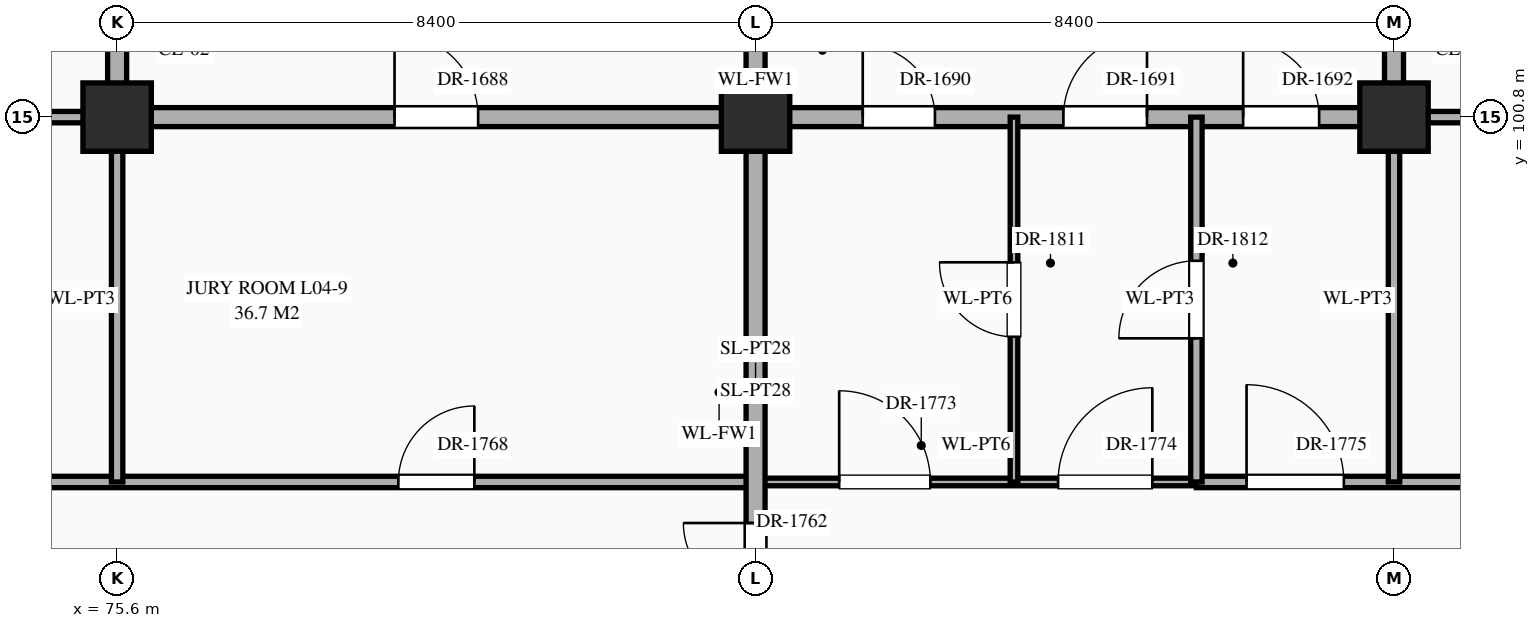
"""IFC4 building model, lengths in metres.
Left out: names, types, materials, properties, quantities, classifications, styles, units other than length and angle.
Written with IfcOpenShell. Run it as: python <this file> out.ifc"""

import sys

from ifc_helpers import new_model, si_unit, direction, frame, frame_2d, origin, origin_2d, place, context, subcontext, project, spatial, rectangle, extrude, element, fill, save


model = new_model("IFC4")
c1 = context("Model", 3, precision=1e-05, world=origin(), true_north=direction((0.0, 1.0)))
c2 = subcontext(c1, "Body", "Model", "MODEL_VIEW")
j1 = project(units=[si_unit("LENGTHUNIT", "METRE"), si_unit("PLANEANGLEUNIT", "RADIAN")], contexts=[c1])
p1 = place(None, origin())
s1 = spatial("IfcSite", under=j1, at=p1, CompositionType="ELEMENT")
p2 = place(p1, origin())
s2 = spatial("IfcBuilding", under=s1, at=p2, CompositionType="ELEMENT")
p3 = place(p2, frame((0.0, 0.0, 16.2)))
s3 = spatial("IfcBuildingStorey", under=s2, at=p3, CompositionType="ELEMENT", Elevation=16.2)
for number, where, z_axis, x_axis in (
    (1, (75.6, 100.8, 0.0), (0.0, 0.0, 1.0), (1.0, 0.0, 0.0)),
    (2, (84.0, 100.8, 0.0), (0.0, 0.0, 1.0), (1.0, 0.0, 0.0)),
    (3, (92.4, 100.8, 0.0), (0.0, 0.0, 1.0), (1.0, 0.0, 0.0)),
):
    element("IfcColumn", number, at=place(p3, frame(where, z_axis=z_axis, x_axis=x_axis)), inside=s3, PredefinedType="COLUMN", context=c2, shape_type="SweptSolid", body=[
        extrude(rectangle(XDim=0.9, YDim=0.9, at=origin_2d()), origin(), (0.0, 0.0, 1.0), 5.4),
    ])
p4 = place(p3, frame((56.2, 96.0, 0.0), z_axis=(0.0, 0.0, 1.0), x_axis=(1.0, 0.0, 0.0)))
e4 = element("IfcWall", 4, at=p4, inside=s3, PredefinedType="STANDARD", context=c2, shape_type="SweptSolid", body=[
    extrude(rectangle(XDim=27.8, YDim=0.15, at=frame_2d((13.9, 0.0))), origin(), (0.0, 0.0, 1.0), 5.12),
])
p5 = place(p4, frame((0.87, 0.0, 0.0)))
e5 = element("IfcOpeningElement", 5, at=p5, cuts=e4, PredefinedType="OPENING", context=c2, shape_type="SweptSolid", body=[
    extrude(rectangle(XDim=0.86, YDim=2.1, at=frame_2d((0.43, 1.05))), frame((0.0, 0.087, 0.0), z_axis=(0.0, -1.0, 0.0), x_axis=(1.0, 0.0, 0.0)), (0.0, 0.0, 1.0), 0.174),
])
p6 = place(p4, frame((6.34, 0.0, 0.0)))
e6 = element("IfcOpeningElement", 6, at=p6, cuts=e4, PredefinedType="OPENING", context=c2, shape_type="SweptSolid", body=[
    extrude(rectangle(XDim=0.92, YDim=2.15, at=frame_2d((0.46, 1.075))), frame((0.0, 0.087, 0.0), z_axis=(0.0, -1.0, 0.0), x_axis=(1.0, 0.0, 0.0)), (0.0, 0.0, 1.0), 0.174),
])
p7 = place(p4, frame((14.72, 0.0, 0.0)))
e7 = element("IfcOpeningElement", 7, at=p7, cuts=e4, PredefinedType="OPENING", context=c2, shape_type="SweptSolid", body=[
    extrude(rectangle(XDim=0.96, YDim=2.2, at=frame_2d((0.48, 1.1))), frame((0.0, 0.087, 0.0), z_axis=(0.0, -1.0, 0.0), x_axis=(1.0, 0.0, 0.0)), (0.0, 0.0, 1.0), 0.174),
])
p8 = place(p4, frame((23.1, 0.0, 0.0)))
e8 = element("IfcOpeningElement", 8, at=p8, cuts=e4, PredefinedType="OPENING", context=c2, shape_type="SweptSolid", body=[
    extrude(rectangle(XDim=1.0, YDim=2.25, at=frame_2d((0.5, 1.125))), frame((0.0, 0.087, 0.0), z_axis=(0.0, -1.0, 0.0), x_axis=(1.0, 0.0, 0.0)), (0.0, 0.0, 1.0), 0.174),
])
p9 = place(p3, frame((84.0, 96.0, 0.0), z_axis=(0.0, 0.0, 1.0), x_axis=(1.0, 0.0, 0.0)))
e9 = element("IfcWall", 9, at=p9, inside=s3, PredefinedType="STANDARD", context=c2, shape_type="SweptSolid", body=[
    extrude(rectangle(XDim=5.8, YDim=0.1, at=frame_2d((2.9, 0.0))), origin(), (0.0, 0.0, 1.0), 5.12),
])
p10 = place(p9, frame((1.1, 0.0, 0.0)))
e10 = element("IfcOpeningElement", 10, at=p10, cuts=e9, PredefinedType="OPENING", context=c2, shape_type="SweptSolid", body=[
    extrude(rectangle(XDim=1.2, YDim=2.35, at=frame_2d((0.6, 1.175))), frame((0.0, 0.062, 0.0), z_axis=(0.0, -1.0, 0.0), x_axis=(1.0, 0.0, 0.0)), (0.0, 0.0, 1.0), 0.124),
])
p11 = place(p9, frame((3.98, 0.0, 0.0)))
e11 = element("IfcOpeningElement", 11, at=p11, cuts=e9, PredefinedType="OPENING", context=c2, shape_type="SweptSolid", body=[
    extrude(rectangle(XDim=1.24, YDim=2.3, at=frame_2d((0.62, 1.15))), frame((0.0, 0.062, 0.0), z_axis=(0.0, -1.0, 0.0), x_axis=(1.0, 0.0, 0.0)), (0.0, 0.0, 1.0), 0.124),
])
p12 = place(p3, frame((89.8, 96.0, 0.0), z_axis=(0.0, 0.0, 1.0), x_axis=(1.0, 0.0, 0.0)))
e12 = element("IfcWall", 12, at=p12, inside=s3, PredefinedType="STANDARD", context=c2, shape_type="SweptSolid", body=[
    extrude(rectangle(XDim=19.4, YDim=0.15, at=frame_2d((9.7, 0.0))), origin(), (0.0, 0.0, 1.0), 5.12),
])
p13 = place(p12, frame((0.66, 0.0, 0.0)))
e13 = element("IfcOpeningElement", 13, at=p13, cuts=e12, PredefinedType="OPENING", context=c2, shape_type="SweptSolid", body=[
    extrude(rectangle(XDim=1.28, YDim=2.35, at=frame_2d((0.64, 1.175))), frame((0.0, 0.087, 0.0), z_axis=(0.0, -1.0, 0.0), x_axis=(1.0, 0.0, 0.0)), (0.0, 0.0, 1.0), 0.174),
])
p14 = place(p12, frame((6.33, 0.0, 0.0)))
e14 = element("IfcOpeningElement", 14, at=p14, cuts=e12, PredefinedType="OPENING", context=c2, shape_type="SweptSolid", body=[
    extrude(rectangle(XDim=0.94, YDim=2.3, at=frame_2d((0.47, 1.15))), frame((0.0, 0.087, 0.0), z_axis=(0.0, -1.0, 0.0), x_axis=(1.0, 0.0, 0.0)), (0.0, 0.0, 1.0), 0.174),
])
p15 = place(p12, frame((14.71, 0.0, 0.0)))
e15 = element("IfcOpeningElement", 15, at=p15, cuts=e12, PredefinedType="OPENING", context=c2, shape_type="SweptSolid", body=[
    extrude(rectangle(XDim=0.98, YDim=2.35, at=frame_2d((0.49, 1.175))), frame((0.0, 0.087, 0.0), z_axis=(0.0, -1.0, 0.0), x_axis=(1.0, 0.0, 0.0)), (0.0, 0.0, 1.0), 0.174),
])
p16 = place(p3, frame((71.4, 100.8, 0.0), z_axis=(0.0, 0.0, 1.0), x_axis=(1.0, 0.0, 0.0)))
e16 = element("IfcWall", 16, at=p16, inside=s3, PredefinedType="STANDARD", context=c2, shape_type="SweptSolid", body=[
    extrude(rectangle(XDim=4.2, YDim=0.15, at=frame_2d((2.1, 0.0))), origin(), (0.0, 0.0, 1.0), 4.27),
])
p17 = place(p16, frame((1.335, 0.0, 0.0)))
e17 = element("IfcOpeningElement", 17, at=p17, cuts=e16, PredefinedType="OPENING", context=c2, shape_type="SweptSolid", body=[
    extrude(rectangle(XDim=1.16, YDim=2.3, at=frame_2d((0.58, 1.15))), frame((0.0, 0.087, 0.0), z_axis=(0.0, -1.0, 0.0), x_axis=(1.0, 0.0, 0.0)), (0.0, 0.0, 1.0), 0.174),
])
p18 = place(p3, frame((75.6, 100.8, 0.0), z_axis=(0.0, 0.0, 1.0), x_axis=(1.0, 0.0, 0.0)))
e18 = element("IfcWall", 18, at=p18, inside=s3, PredefinedType="STANDARD", context=c2, shape_type="SweptSolid", body=[
    extrude(rectangle(XDim=16.8, YDim=0.25, at=frame_2d((8.4, 0.0))), origin(), (0.0, 0.0, 1.0), 4.27),
])
p19 = place(p18, frame((3.65, 0.0, 0.0)))
e19 = element("IfcOpeningElement", 19, at=p19, cuts=e18, PredefinedType="OPENING", context=c2, shape_type="SweptSolid", body=[
    extrude(rectangle(XDim=1.1, YDim=2.2, at=frame_2d((0.55, 1.1))), frame((0.0, 0.137, 0.0), z_axis=(0.0, -1.0, 0.0), x_axis=(1.0, 0.0, 0.0)), (0.0, 0.0, 1.0), 0.274),
])
p20 = place(p18, frame((9.81, 0.0, 0.0)))
e20 = element("IfcOpeningElement", 20, at=p20, cuts=e18, PredefinedType="OPENING", context=c2, shape_type="SweptSolid", body=[
    extrude(rectangle(XDim=0.95, YDim=2.15, at=frame_2d((0.475, 1.075))), frame((0.0, 0.137, 0.0), z_axis=(0.0, -1.0, 0.0), x_axis=(1.0, 0.0, 0.0)), (0.0, 0.0, 1.0), 0.274),
])
p21 = place(p18, frame((12.45, 0.0, 0.0)))
e21 = element("IfcOpeningElement", 21, at=p21, cuts=e18, PredefinedType="OPENING", context=c2, shape_type="SweptSolid", body=[
    extrude(rectangle(XDim=1.1, YDim=2.2, at=frame_2d((0.55, 1.1))), frame((0.0, 0.137, 0.0), z_axis=(0.0, -1.0, 0.0), x_axis=(1.0, 0.0, 0.0)), (0.0, 0.0, 1.0), 0.274),
])
p22 = place(p18, frame((14.815, 0.0, 0.0)))
e22 = element("IfcOpeningElement", 22, at=p22, cuts=e18, PredefinedType="OPENING", context=c2, shape_type="SweptSolid", body=[
    extrude(rectangle(XDim=1.0, YDim=2.2, at=frame_2d((0.5, 1.1))), frame((0.0, 0.137, 0.0), z_axis=(0.0, -1.0, 0.0), x_axis=(1.0, 0.0, 0.0)), (0.0, 0.0, 1.0), 0.274),
])
p23 = place(p3, frame((92.4, 100.8, 0.0), z_axis=(0.0, 0.0, 1.0), x_axis=(1.0, 0.0, 0.0)))
e23 = element("IfcWall", 23, at=p23, inside=s3, PredefinedType="STANDARD", context=c2, shape_type="SweptSolid", body=[
    extrude(rectangle(XDim=4.2, YDim=0.15, at=frame_2d((2.1, 0.0))), origin(), (0.0, 0.0, 1.0), 4.27),
])
p24 = place(p23, frame((1.795, 0.0, 0.0)))
e24 = element("IfcOpeningElement", 24, at=p24, cuts=e23, PredefinedType="OPENING", context=c2, shape_type="SweptSolid", body=[
    extrude(rectangle(XDim=0.98, YDim=2.35, at=frame_2d((0.49, 1.175))), frame((0.0, 0.087, 0.0), z_axis=(0.0, -1.0, 0.0), x_axis=(1.0, 0.0, 0.0)), (0.0, 0.0, 1.0), 0.174),
])
p25 = place(p3, frame((75.6, 96.0, 0.0), z_axis=(0.0, 0.0, 1.0), x_axis=(0.0, 1.0, 0.0)))
e25 = element("IfcWall", 25, at=p25, inside=s3, PredefinedType="STANDARD", context=c2, shape_type="SweptSolid", body=[
    extrude(rectangle(XDim=4.8, YDim=0.15, at=frame_2d((2.4, 0.0))), origin(), (0.0, 0.0, 1.0), 4.37),
])
p26 = place(p3, frame((75.6, 100.8, 0.0), z_axis=(0.0, 0.0, 1.0), x_axis=(0.0, 1.0, 0.0)))
e26 = element("IfcWall", 26, at=p26, inside=s3, PredefinedType="STANDARD", context=c2, shape_type="SweptSolid", body=[
    extrude(rectangle(XDim=3.6, YDim=0.25, at=frame_2d((1.8, 0.0))), origin(), (0.0, 0.0, 1.0), 4.37),
])
p27 = place(p26, frame((0.91, 0.0, 0.0)))
e27 = element("IfcOpeningElement", 27, at=p27, cuts=e26, PredefinedType="OPENING", context=c2, shape_type="SweptSolid", body=[
    extrude(rectangle(XDim=0.95, YDim=2.15, at=frame_2d((0.475, 1.075))), frame((0.0, 0.137, 0.0), z_axis=(0.0, -1.0, 0.0), x_axis=(1.0, 0.0, 0.0)), (0.0, 0.0, 1.0), 0.274),
])
p28 = place(p3, frame((84.0, 79.2, 0.0), z_axis=(0.0, 0.0, 1.0), x_axis=(0.0, 1.0, 0.0)))
e28 = element("IfcWall", 28, at=p28, inside=s3, PredefinedType="STANDARD", context=c2, shape_type="SweptSolid", body=[
    extrude(rectangle(XDim=35.96, YDim=0.25, at=frame_2d((17.98, 0.0))), origin(), (0.0, 0.0, 1.0), 4.37),
])
p29 = place(p28, frame((22.585, 0.0, 0.0)))
e29 = element("IfcOpeningElement", 29, at=p29, cuts=e28, PredefinedType="OPENING", context=c2, shape_type="SweptSolid", body=[
    extrude(rectangle(XDim=2.0, YDim=2.4, at=frame_2d((1.0, 1.2))), frame((0.0, 0.137, 0.0), z_axis=(0.0, -1.0, 0.0), x_axis=(1.0, 0.0, 0.0)), (0.0, 0.0, 1.0), 0.274),
])
p30 = place(p28, frame((12.465, 0.0, 0.0)))
e30 = element("IfcOpeningElement", 30, at=p30, cuts=e28, PredefinedType="OPENING", context=c2, shape_type="SweptSolid", body=[
    extrude(rectangle(XDim=1.1, YDim=2.2, at=frame_2d((0.55, 1.1))), frame((0.0, 0.137, 0.0), z_axis=(0.0, -1.0, 0.0), x_axis=(1.0, 0.0, 0.0)), (0.0, 0.0, 1.0), 0.274),
])
p31 = place(p28, frame((15.31, 0.0, 0.0)))
e31 = element("IfcOpeningElement", 31, at=p31, cuts=e28, PredefinedType="OPENING", context=c2, shape_type="SweptSolid", body=[
    extrude(rectangle(XDim=0.95, YDim=2.15, at=frame_2d((0.475, 1.075))), frame((0.0, 0.137, 0.0), z_axis=(0.0, -1.0, 0.0), x_axis=(1.0, 0.0, 0.0)), (0.0, 0.0, 1.0), 0.274),
])
p32 = place(p28, frame((26.065, 0.0, 0.0)))
e32 = element("IfcOpeningElement", 32, at=p32, cuts=e28, PredefinedType="OPENING", context=c2, shape_type="SweptSolid", body=[
    extrude(rectangle(XDim=1.5, YDim=2.25, at=frame_2d((0.75, 1.125))), frame((0.0, 0.137, 0.0), z_axis=(0.0, -1.0, 0.0), x_axis=(1.0, 0.0, 0.0)), (0.0, 0.0, 1.0), 0.274),
])
p33 = place(p28, frame((29.71, 0.0, 0.0)))
e33 = element("IfcOpeningElement", 33, at=p33, cuts=e28, PredefinedType="OPENING", context=c2, shape_type="SweptSolid", body=[
    extrude(rectangle(XDim=0.95, YDim=2.15, at=frame_2d((0.475, 1.075))), frame((0.0, 0.137, 0.0), z_axis=(0.0, -1.0, 0.0), x_axis=(1.0, 0.0, 0.0)), (0.0, 0.0, 1.0), 0.274),
])
p34 = place(p28, frame((5.315, 0.0, 0.0)))
e34 = element("IfcOpeningElement", 34, at=p34, cuts=e28, PredefinedType="OPENING", context=c2, shape_type="SweptSolid", body=[
    extrude(rectangle(XDim=1.0, YDim=2.2, at=frame_2d((0.5, 1.1))), frame((0.0, 0.137, 0.0), z_axis=(0.0, -1.0, 0.0), x_axis=(1.0, 0.0, 0.0)), (0.0, 0.0, 1.0), 0.274),
])
p35 = place(p3, frame((87.4, 96.0, 0.0), z_axis=(0.0, 0.0, 1.0), x_axis=(0.0, 1.0, 0.0)))
e35 = element("IfcWall", 35, at=p35, inside=s3, PredefinedType="STANDARD", context=c2, shape_type="SweptSolid", body=[
    extrude(rectangle(XDim=4.8, YDim=0.1, at=frame_2d((2.4, 0.0))), origin(), (0.0, 0.0, 1.0), 5.12),
])
p36 = place(p35, frame((1.91, 0.0, 0.0)))
e36 = element("IfcOpeningElement", 36, at=p36, cuts=e35, PredefinedType="OPENING", context=c2, shape_type="SweptSolid", body=[
    extrude(rectangle(XDim=0.98, YDim=2.35, at=frame_2d((0.49, 1.175))), frame((0.0, 0.062, 0.0), z_axis=(0.0, -1.0, 0.0), x_axis=(1.0, 0.0, 0.0)), (0.0, 0.0, 1.0), 0.124),
])
p37 = place(p3, frame((89.8, 96.0, 0.0), z_axis=(0.0, 0.0, 1.0), x_axis=(0.0, 1.0, 0.0)))
e37 = element("IfcWall", 37, at=p37, inside=s3, PredefinedType="STANDARD", context=c2, shape_type="SweptSolid", body=[
    extrude(rectangle(XDim=4.8, YDim=0.15, at=frame_2d((2.4, 0.0))), origin(), (0.0, 0.0, 1.0), 5.12),
])
p38 = place(p37, frame((1.89, 0.0, 0.0)))
e38 = element("IfcOpeningElement", 38, at=p38, cuts=e37, PredefinedType="OPENING", context=c2, shape_type="SweptSolid", body=[
    extrude(rectangle(XDim=1.02, YDim=2.4, at=frame_2d((0.51, 1.2))), frame((0.0, 0.087, 0.0), z_axis=(0.0, -1.0, 0.0), x_axis=(1.0, 0.0, 0.0)), (0.0, 0.0, 1.0), 0.174),
])
p39 = place(p3, frame((92.4, 96.0, 0.0), z_axis=(0.0, 0.0, 1.0), x_axis=(0.0, 1.0, 0.0)))
e39 = element("IfcWall", 39, at=p39, inside=s3, PredefinedType="STANDARD", context=c2, shape_type="SweptSolid", body=[
    extrude(rectangle(XDim=4.8, YDim=0.15, at=frame_2d((2.4, 0.0))), origin(), (0.0, 0.0, 1.0), 4.37),
])
p40 = place(p3, frame((92.4, 100.8, 0.0), z_axis=(0.0, 0.0, 1.0), x_axis=(0.0, 1.0, 0.0)))
e40 = element("IfcWall", 40, at=p40, inside=s3, PredefinedType="STANDARD", context=c2, shape_type="SweptSolid", body=[
    extrude(rectangle(XDim=3.6, YDim=0.25, at=frame_2d((1.8, 0.0))), origin(), (0.0, 0.0, 1.0), 4.37),
])
p41 = place(p40, frame((0.885, 0.0, 0.0)))
e41 = element("IfcOpeningElement", 41, at=p41, cuts=e40, PredefinedType="OPENING", context=c2, shape_type="SweptSolid", body=[
    extrude(rectangle(XDim=1.0, YDim=2.2, at=frame_2d((0.5, 1.1))), frame((0.0, 0.137, 0.0), z_axis=(0.0, -1.0, 0.0), x_axis=(1.0, 0.0, 0.0)), (0.0, 0.0, 1.0), 0.274),
])
p42 = place(p19, origin())
e42 = element("IfcDoor", 42, at=p42, inside=s3, OperationType="SINGLE_SWING_LEFT", PredefinedType="DOOR", context=c2, shape_type="SweptSolid", body=[
    extrude(rectangle(XDim=1.1, YDim=2.2, at=frame_2d((0.55, 1.1))), frame((0.0, 0.025, 0.0), z_axis=(0.0, -1.0, 0.0), x_axis=(1.0, 0.0, 0.0)), (0.0, 0.0, 1.0), 0.05),
])
fill(e19, e42)
p43 = place(p20, origin())
e43 = element("IfcDoor", 43, at=p43, inside=s3, OperationType="SINGLE_SWING_LEFT", PredefinedType="DOOR", context=c2, shape_type="SweptSolid", body=[
    extrude(rectangle(XDim=0.95, YDim=2.15, at=frame_2d((0.475, 1.075))), frame((0.0, 0.025, 0.0), z_axis=(0.0, -1.0, 0.0), x_axis=(1.0, 0.0, 0.0)), (0.0, 0.0, 1.0), 0.05),
])
fill(e20, e43)
p44 = place(p21, origin())
e44 = element("IfcDoor", 44, at=p44, inside=s3, OperationType="SINGLE_SWING_RIGHT", PredefinedType="DOOR", context=c2, shape_type="SweptSolid", body=[
    extrude(rectangle(XDim=1.1, YDim=2.2, at=frame_2d((0.55, 1.1))), frame((0.0, 0.025, 0.0), z_axis=(0.0, -1.0, 0.0), x_axis=(1.0, 0.0, 0.0)), (0.0, 0.0, 1.0), 0.05),
])
fill(e21, e44)
p45 = place(p22, origin())
e45 = element("IfcDoor", 45, at=p45, inside=s3, OperationType="SINGLE_SWING_LEFT", PredefinedType="DOOR", context=c2, shape_type="SweptSolid", body=[
    extrude(rectangle(XDim=1.0, YDim=2.2, at=frame_2d((0.5, 1.1))), frame((0.0, 0.025, 0.0), z_axis=(0.0, -1.0, 0.0), x_axis=(1.0, 0.0, 0.0)), (0.0, 0.0, 1.0), 0.05),
])
fill(e22, e45)
p46 = place(p31, origin())
e46 = element("IfcDoor", 46, at=p46, inside=s3, OperationType="SINGLE_SWING_RIGHT", PredefinedType="DOOR", context=c2, shape_type="SweptSolid", body=[
    extrude(rectangle(XDim=0.95, YDim=2.15, at=frame_2d((0.475, 1.075))), frame((0.0, 0.025, 0.0), z_axis=(0.0, -1.0, 0.0), x_axis=(1.0, 0.0, 0.0)), (0.0, 0.0, 1.0), 0.05),
])
fill(e31, e46)
p47 = place(p8, origin())
e47 = element("IfcDoor", 47, at=p47, inside=s3, OperationType="SINGLE_SWING_RIGHT", PredefinedType="DOOR", context=c2, shape_type="SweptSolid", body=[
    extrude(rectangle(XDim=1.0, YDim=2.25, at=frame_2d((0.5, 1.125))), frame((0.0, 0.025, 0.0), z_axis=(0.0, -1.0, 0.0), x_axis=(1.0, 0.0, 0.0)), (0.0, 0.0, 1.0), 0.05),
])
fill(e8, e47)
p48 = place(p10, origin())
e48 = element("IfcDoor", 48, at=p48, inside=s3, OperationType="SINGLE_SWING_LEFT", PredefinedType="DOOR", context=c2, shape_type="SweptSolid", body=[
    extrude(rectangle(XDim=1.2, YDim=2.35, at=frame_2d((0.6, 1.175))), frame((0.0, 0.025, 0.0), z_axis=(0.0, -1.0, 0.0), x_axis=(1.0, 0.0, 0.0)), (0.0, 0.0, 1.0), 0.05),
])
fill(e10, e48)
p49 = place(p11, origin())
e49 = element("IfcDoor", 49, at=p49, inside=s3, OperationType="SINGLE_SWING_RIGHT", PredefinedType="DOOR", context=c2, shape_type="SweptSolid", body=[
    extrude(rectangle(XDim=1.24, YDim=2.3, at=frame_2d((0.62, 1.15))), frame((0.0, 0.025, 0.0), z_axis=(0.0, -1.0, 0.0), x_axis=(1.0, 0.0, 0.0)), (0.0, 0.0, 1.0), 0.05),
])
fill(e11, e49)
p50 = place(p13, origin())
e50 = element("IfcDoor", 50, at=p50, inside=s3, OperationType="SINGLE_SWING_LEFT", PredefinedType="DOOR", context=c2, shape_type="SweptSolid", body=[
    extrude(rectangle(XDim=1.28, YDim=2.35, at=frame_2d((0.64, 1.175))), frame((0.0, 0.025, 0.0), z_axis=(0.0, -1.0, 0.0), x_axis=(1.0, 0.0, 0.0)), (0.0, 0.0, 1.0), 0.05),
])
fill(e13, e50)
p51 = place(p36, origin())
e51 = element("IfcDoor", 51, at=p51, inside=s3, OperationType="SINGLE_SWING_RIGHT", PredefinedType="DOOR", context=c2, shape_type="SweptSolid", body=[
    extrude(rectangle(XDim=0.98, YDim=2.35, at=frame_2d((0.49, 1.175))), frame((0.0, 0.025, 0.0), z_axis=(0.0, -1.0, 0.0), x_axis=(1.0, 0.0, 0.0)), (0.0, 0.0, 1.0), 0.05),
])
fill(e36, e51)
p52 = place(p38, origin())
e52 = element("IfcDoor", 52, at=p52, inside=s3, OperationType="SINGLE_SWING_LEFT", PredefinedType="DOOR", context=c2, shape_type="SweptSolid", body=[
    extrude(rectangle(XDim=1.02, YDim=2.4, at=frame_2d((0.51, 1.2))), frame((0.0, 0.025, 0.0), z_axis=(0.0, -1.0, 0.0), x_axis=(1.0, 0.0, 0.0)), (0.0, 0.0, 1.0), 0.05),
])
fill(e38, e52)
save(model, sys.argv[1])
